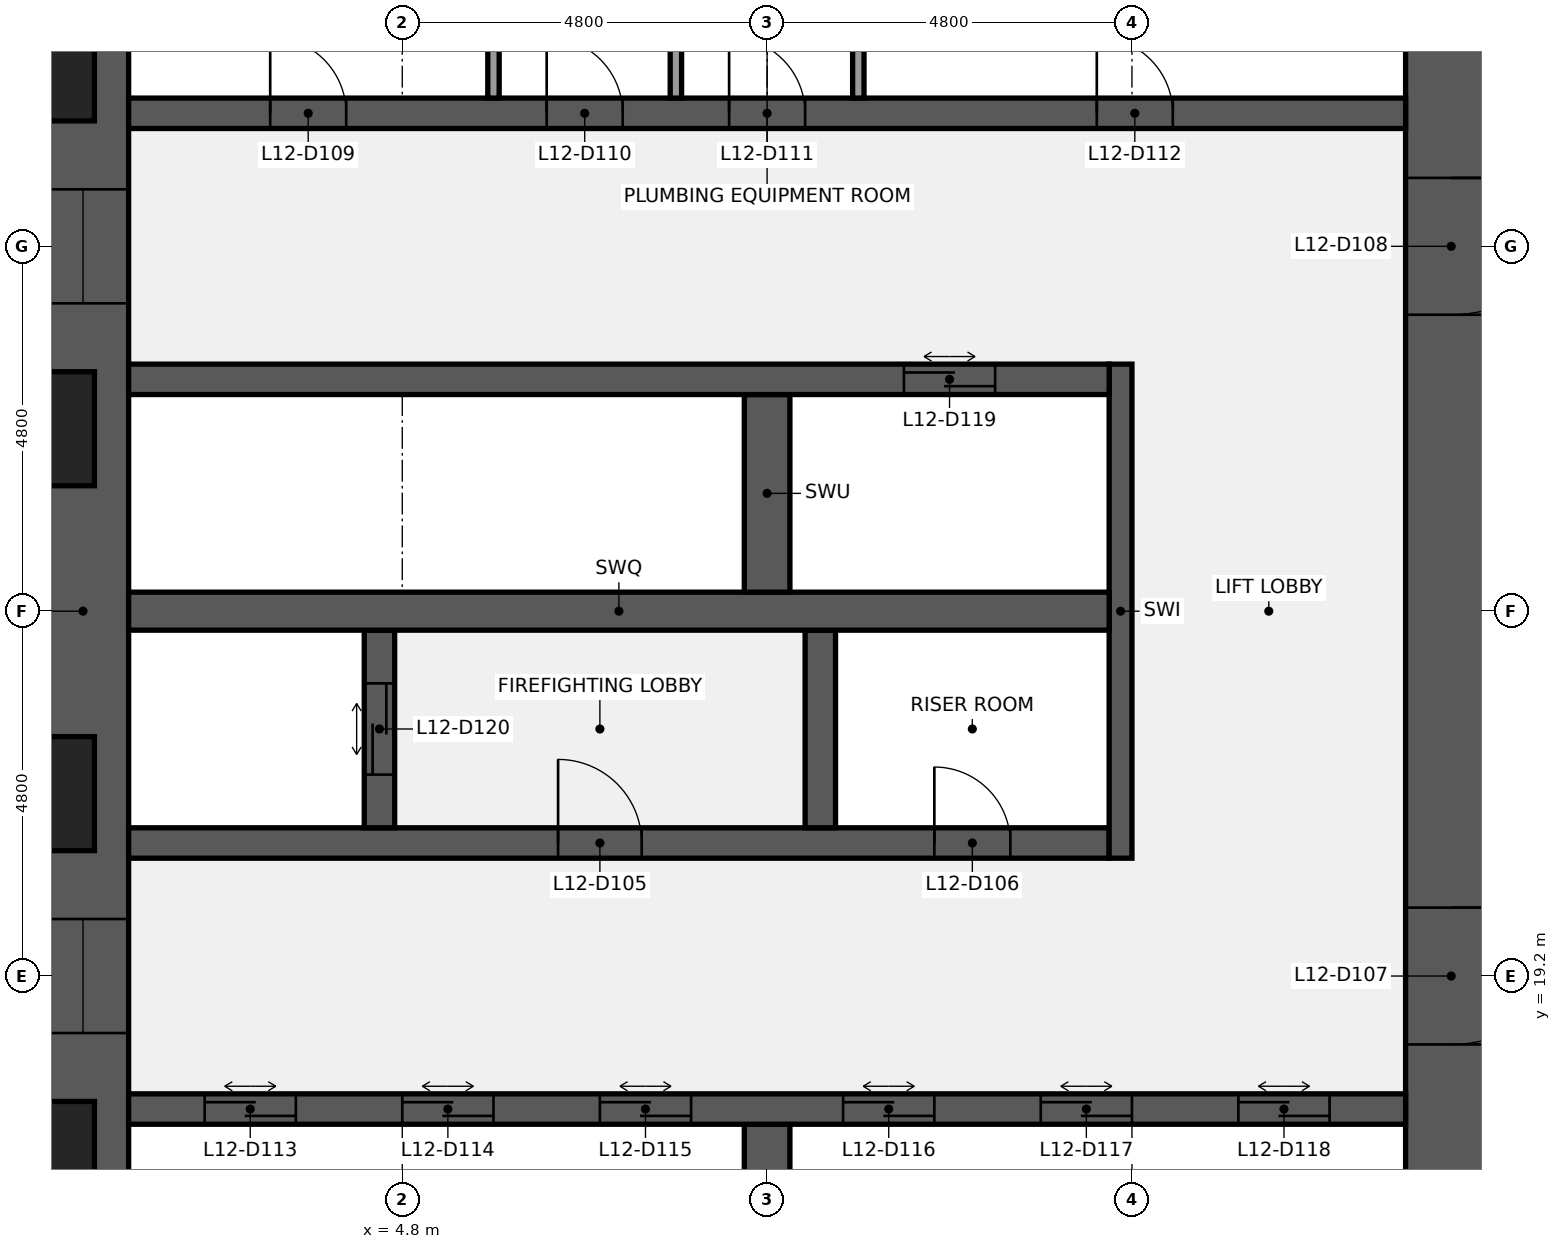
"""IFC4 building model, lengths in metres.
Left out: names, types, materials, properties, quantities, classifications, styles, units other than length and angle.
Written with IfcOpenShell. Run it as: python <this file> out.ifc"""

import sys

from ifc_helpers import new_model, si_unit, direction, frame, frame_2d, origin, place, context, subcontext, project, spatial, rectangle, extrude, element, fill, save


model = new_model("IFC4")
c1 = context("Model", 3, precision=1e-05, world=origin(), true_north=direction((0.0, 1.0)))
c2 = subcontext(c1, "Body", "Model", "MODEL_VIEW")
j1 = project(units=[si_unit("LENGTHUNIT", "METRE"), si_unit("PLANEANGLEUNIT", "RADIAN")], contexts=[c1])
p1 = place(None, origin())
s1 = spatial("IfcSite", under=j1, at=p1, CompositionType="ELEMENT")
p2 = place(p1, origin())
s2 = spatial("IfcBuilding", under=s1, at=p2, CompositionType="ELEMENT")
p3 = place(p2, frame((0.0, 0.0, 59.0)))
s3 = spatial("IfcBuildingStorey", under=s2, at=p3, CompositionType="ELEMENT", Elevation=59.0)
p4 = place(p3, frame((0.6, 9.6, 0.0), z_axis=(0.0, 0.0, 1.0), x_axis=(0.0, 1.0, 0.0)))
e1 = element("IfcWall", 1, at=p4, inside=s3, PredefinedType="SHEAR", context=c2, shape_type="SweptSolid", body=[
    extrude(rectangle(XDim=28.8, YDim=1.2, at=frame_2d((14.4, 0.0))), origin(), (0.0, 0.0, 1.0), 3.84),
])
p5 = place(p4, frame((8.85, 0.0, 0.9)))
e2 = element("IfcOpeningElement", 2, at=p5, cuts=e1, PredefinedType="OPENING", context=c2, shape_type="SweptSolid", body=[
    extrude(rectangle(XDim=1.5, YDim=1.5, at=frame_2d((0.75, 0.75))), frame((0.0, 0.61, 0.0), z_axis=(0.0, -1.0, 0.0), x_axis=(1.0, 0.0, 0.0)), (0.0, 0.0, 1.0), 1.22),
])
p6 = place(p4, frame((18.45, 0.0, 0.9)))
e3 = element("IfcOpeningElement", 3, at=p6, cuts=e1, PredefinedType="OPENING", context=c2, shape_type="SweptSolid", body=[
    extrude(rectangle(XDim=1.5, YDim=1.5, at=frame_2d((0.75, 0.75))), frame((0.0, 0.61, 0.0), z_axis=(0.0, -1.0, 0.0), x_axis=(1.0, 0.0, 0.0)), (0.0, 0.0, 1.0), 1.22),
])
p7 = place(p3, frame((18.6, 38.4, 0.0), z_axis=(0.0, 0.0, 1.0), x_axis=(0.0, -1.0, 0.0)))
e4 = element("IfcWall", 4, at=p7, inside=s3, PredefinedType="SHEAR", context=c2, shape_type="SweptSolid", body=[
    extrude(rectangle(XDim=28.8, YDim=1.2, at=frame_2d((14.4, 0.0))), origin(), (0.0, 0.0, 1.0), 3.84),
])
p8 = place(p7, frame((18.3, 0.0, 0.0)))
e5 = element("IfcOpeningElement", 5, at=p8, cuts=e4, PredefinedType="OPENING", context=c2, shape_type="SweptSolid", body=[
    extrude(rectangle(XDim=1.8, YDim=2.1, at=frame_2d((0.9, 1.05))), frame((0.0, 0.61, 0.0), z_axis=(0.0, -1.0, 0.0), x_axis=(1.0, 0.0, 0.0)), (0.0, 0.0, 1.0), 1.22),
])
p9 = place(p7, frame((8.7, 0.0, 0.0)))
e6 = element("IfcOpeningElement", 6, at=p9, cuts=e4, PredefinedType="OPENING", context=c2, shape_type="SweptSolid", body=[
    extrude(rectangle(XDim=1.8, YDim=2.1, at=frame_2d((0.9, 1.05))), frame((0.0, 0.61, 0.0), z_axis=(0.0, -1.0, 0.0), x_axis=(1.0, 0.0, 0.0)), (0.0, 0.0, 1.0), 1.22),
])
p10 = place(p3, frame((9.6, 14.65, 0.0), z_axis=(0.0, 0.0, 1.0), x_axis=(0.0, 1.0, 0.0)))
e7 = element("IfcWall", 7, at=p10, inside=s3, PredefinedType="SHEAR", context=c2, shape_type="SweptSolid", body=[
    extrude(rectangle(XDim=2.6, YDim=0.6, at=frame_2d((1.3, 0.0))), origin(), (0.0, 0.0, 1.0), 3.84),
])
p11 = place(p3, frame((1.2, 17.45, 0.0), z_axis=(0.0, 0.0, 1.0), x_axis=(1.0, 0.0, 0.0)))
e8 = element("IfcWall", 8, at=p11, inside=s3, PredefinedType="SHEAR", context=c2, shape_type="SweptSolid", body=[
    extrude(rectangle(XDim=16.8, YDim=0.4, at=frame_2d((8.4, 0.0))), origin(), (0.0, 0.0, 1.0), 3.84),
])
p12 = place(p11, frame((1.0, 0.0, 0.0)))
e9 = element("IfcOpeningElement", 9, at=p12, cuts=e8, PredefinedType="OPENING", context=c2, shape_type="SweptSolid", body=[
    extrude(rectangle(XDim=1.2, YDim=2.1, at=frame_2d((0.6, 1.05))), frame((0.0, 0.21, 0.0), z_axis=(0.0, -1.0, 0.0), x_axis=(1.0, 0.0, 0.0)), (0.0, 0.0, 1.0), 0.42),
])
p13 = place(p11, frame((3.6, 0.0, 0.0)))
e10 = element("IfcOpeningElement", 10, at=p13, cuts=e8, PredefinedType="OPENING", context=c2, shape_type="SweptSolid", body=[
    extrude(rectangle(XDim=1.2, YDim=2.1, at=frame_2d((0.6, 1.05))), frame((0.0, 0.21, 0.0), z_axis=(0.0, -1.0, 0.0), x_axis=(1.0, 0.0, 0.0)), (0.0, 0.0, 1.0), 0.42),
])
p14 = place(p11, frame((6.2, 0.0, 0.0)))
e11 = element("IfcOpeningElement", 11, at=p14, cuts=e8, PredefinedType="OPENING", context=c2, shape_type="SweptSolid", body=[
    extrude(rectangle(XDim=1.2, YDim=2.1, at=frame_2d((0.6, 1.05))), frame((0.0, 0.21, 0.0), z_axis=(0.0, -1.0, 0.0), x_axis=(1.0, 0.0, 0.0)), (0.0, 0.0, 1.0), 0.42),
])
p15 = place(p11, frame((9.4, 0.0, 0.0)))
e12 = element("IfcOpeningElement", 12, at=p15, cuts=e8, PredefinedType="OPENING", context=c2, shape_type="SweptSolid", body=[
    extrude(rectangle(XDim=1.2, YDim=2.1, at=frame_2d((0.6, 1.05))), frame((0.0, 0.21, 0.0), z_axis=(0.0, -1.0, 0.0), x_axis=(1.0, 0.0, 0.0)), (0.0, 0.0, 1.0), 0.42),
])
p16 = place(p11, frame((12.0, 0.0, 0.0)))
e13 = element("IfcOpeningElement", 13, at=p16, cuts=e8, PredefinedType="OPENING", context=c2, shape_type="SweptSolid", body=[
    extrude(rectangle(XDim=1.2, YDim=2.1, at=frame_2d((0.6, 1.05))), frame((0.0, 0.21, 0.0), z_axis=(0.0, -1.0, 0.0), x_axis=(1.0, 0.0, 0.0)), (0.0, 0.0, 1.0), 0.42),
])
p17 = place(p11, frame((14.6, 0.0, 0.0)))
e14 = element("IfcOpeningElement", 14, at=p17, cuts=e8, PredefinedType="OPENING", context=c2, shape_type="SweptSolid", body=[
    extrude(rectangle(XDim=1.2, YDim=2.1, at=frame_2d((0.6, 1.05))), frame((0.0, 0.21, 0.0), z_axis=(0.0, -1.0, 0.0), x_axis=(1.0, 0.0, 0.0)), (0.0, 0.0, 1.0), 0.42),
])
p18 = place(p3, frame((1.2, 20.95, 0.0), z_axis=(0.0, 0.0, 1.0), x_axis=(1.0, 0.0, 0.0)))
e15 = element("IfcWall", 15, at=p18, inside=s3, PredefinedType="SHEAR", context=c2, shape_type="SweptSolid", body=[
    extrude(rectangle(XDim=12.9, YDim=0.4, at=frame_2d((6.45, 0.0))), origin(), (0.0, 0.0, 1.0), 3.84),
])
p19 = place(p18, frame((5.65, 0.0, 0.0)))
e16 = element("IfcOpeningElement", 16, at=p19, cuts=e15, PredefinedType="OPENING", context=c2, shape_type="SweptSolid", body=[
    extrude(rectangle(XDim=1.1, YDim=2.1, at=frame_2d((0.55, 1.05))), frame((0.0, 0.21, 0.0), z_axis=(0.0, -1.0, 0.0), x_axis=(1.0, 0.0, 0.0)), (0.0, 0.0, 1.0), 0.42),
])
p20 = place(p18, frame((10.6, 0.0, 0.0)))
e17 = element("IfcOpeningElement", 17, at=p20, cuts=e15, PredefinedType="OPENING", context=c2, shape_type="SweptSolid", body=[
    extrude(rectangle(XDim=1.0, YDim=2.1, at=frame_2d((0.5, 1.05))), frame((0.0, 0.21, 0.0), z_axis=(0.0, -1.0, 0.0), x_axis=(1.0, 0.0, 0.0)), (0.0, 0.0, 1.0), 0.42),
])
p21 = place(p3, frame((14.25, 20.75, 0.0), z_axis=(0.0, 0.0, 1.0), x_axis=(0.0, 1.0, 0.0)))
e18 = element("IfcWall", 18, at=p21, inside=s3, PredefinedType="SHEAR", context=c2, shape_type="SweptSolid", body=[
    extrude(rectangle(XDim=6.5, YDim=0.3, at=frame_2d((3.25, 0.0))), origin(), (0.0, 0.0, 1.0), 3.84),
])
p22 = place(p3, frame((4.5, 21.15, 0.0), z_axis=(0.0, 0.0, 1.0), x_axis=(0.0, 1.0, 0.0)))
e19 = element("IfcWall", 19, at=p22, inside=s3, PredefinedType="SHEAR", context=c2, shape_type="SweptSolid", body=[
    extrude(rectangle(XDim=2.6, YDim=0.4, at=frame_2d((1.3, 0.0))), origin(), (0.0, 0.0, 1.0), 3.84),
])
p23 = place(p22, frame((0.7, 0.0, 0.0)))
e20 = element("IfcOpeningElement", 20, at=p23, cuts=e19, PredefinedType="OPENING", context=c2, shape_type="SweptSolid", body=[
    extrude(rectangle(XDim=1.2, YDim=2.1, at=frame_2d((0.6, 1.05))), frame((0.0, 0.21, 0.0), z_axis=(0.0, -1.0, 0.0), x_axis=(1.0, 0.0, 0.0)), (0.0, 0.0, 1.0), 0.42),
])
p24 = place(p3, frame((10.3, 21.15, 0.0), z_axis=(0.0, 0.0, 1.0), x_axis=(0.0, 1.0, 0.0)))
e21 = element("IfcWall", 21, at=p24, inside=s3, PredefinedType="SHEAR", context=c2, shape_type="SweptSolid", body=[
    extrude(rectangle(XDim=2.6, YDim=0.4, at=frame_2d((1.3, 0.0))), origin(), (0.0, 0.0, 1.0), 3.84),
])
p25 = place(p3, frame((1.2, 24.0, 0.0), z_axis=(0.0, 0.0, 1.0), x_axis=(1.0, 0.0, 0.0)))
e22 = element("IfcWall", 22, at=p25, inside=s3, PredefinedType="SHEAR", context=c2, shape_type="SweptSolid", body=[
    extrude(rectangle(XDim=12.9, YDim=0.5, at=frame_2d((6.45, 0.0))), origin(), (0.0, 0.0, 1.0), 3.84),
])
p26 = place(p3, frame((9.6, 24.25, 0.0), z_axis=(0.0, 0.0, 1.0), x_axis=(0.0, 1.0, 0.0)))
e23 = element("IfcWall", 23, at=p26, inside=s3, PredefinedType="SHEAR", context=c2, shape_type="SweptSolid", body=[
    extrude(rectangle(XDim=2.6, YDim=0.6, at=frame_2d((1.3, 0.0))), origin(), (0.0, 0.0, 1.0), 3.84),
])
p27 = place(p3, frame((1.2, 27.05, 0.0), z_axis=(0.0, 0.0, 1.0), x_axis=(1.0, 0.0, 0.0)))
e24 = element("IfcWall", 24, at=p27, inside=s3, PredefinedType="SHEAR", context=c2, shape_type="SweptSolid", body=[
    extrude(rectangle(XDim=12.9, YDim=0.4, at=frame_2d((6.45, 0.0))), origin(), (0.0, 0.0, 1.0), 3.84),
])
p28 = place(p27, frame((10.2, 0.0, 0.0)))
e25 = element("IfcOpeningElement", 25, at=p28, cuts=e24, PredefinedType="OPENING", context=c2, shape_type="SweptSolid", body=[
    extrude(rectangle(XDim=1.2, YDim=2.1, at=frame_2d((0.6, 1.05))), frame((0.0, 0.21, 0.0), z_axis=(0.0, -1.0, 0.0), x_axis=(1.0, 0.0, 0.0)), (0.0, 0.0, 1.0), 0.42),
])
p29 = place(p3, frame((1.2, 30.55, 0.0), z_axis=(0.0, 0.0, 1.0), x_axis=(1.0, 0.0, 0.0)))
e26 = element("IfcWall", 26, at=p29, inside=s3, PredefinedType="SHEAR", context=c2, shape_type="SweptSolid", body=[
    extrude(rectangle(XDim=16.8, YDim=0.4, at=frame_2d((8.4, 0.0))), origin(), (0.0, 0.0, 1.0), 3.84),
])
p30 = place(p29, frame((1.863, 0.0, 0.0)))
e27 = element("IfcOpeningElement", 27, at=p30, cuts=e26, PredefinedType="OPENING", context=c2, shape_type="SweptSolid", body=[
    extrude(rectangle(XDim=1.0, YDim=2.1, at=frame_2d((0.5, 1.05))), frame((0.0, 0.21, 0.0), z_axis=(0.0, -1.0, 0.0), x_axis=(1.0, 0.0, 0.0)), (0.0, 0.0, 1.0), 0.42),
])
p31 = place(p29, frame((5.5, 0.0, 0.0)))
e28 = element("IfcOpeningElement", 28, at=p31, cuts=e26, PredefinedType="OPENING", context=c2, shape_type="SweptSolid", body=[
    extrude(rectangle(XDim=1.0, YDim=2.1, at=frame_2d((0.5, 1.05))), frame((0.0, 0.21, 0.0), z_axis=(0.0, -1.0, 0.0), x_axis=(1.0, 0.0, 0.0)), (0.0, 0.0, 1.0), 0.42),
])
p32 = place(p29, frame((7.9, 0.0, 0.0)))
e29 = element("IfcOpeningElement", 29, at=p32, cuts=e26, PredefinedType="OPENING", context=c2, shape_type="SweptSolid", body=[
    extrude(rectangle(XDim=1.0, YDim=2.1, at=frame_2d((0.5, 1.05))), frame((0.0, 0.21, 0.0), z_axis=(0.0, -1.0, 0.0), x_axis=(1.0, 0.0, 0.0)), (0.0, 0.0, 1.0), 0.42),
])
p33 = place(p29, frame((12.738, 0.0, 0.0)))
e30 = element("IfcOpeningElement", 30, at=p33, cuts=e26, PredefinedType="OPENING", context=c2, shape_type="SweptSolid", body=[
    extrude(rectangle(XDim=1.0, YDim=2.1, at=frame_2d((0.5, 1.05))), frame((0.0, 0.21, 0.0), z_axis=(0.0, -1.0, 0.0), x_axis=(1.0, 0.0, 0.0)), (0.0, 0.0, 1.0), 0.42),
])
for number, where, z_axis, x_axis in (
    (31, (6.0, 30.75, 0.0), (0.0, 0.0, 1.0), (0.0, 1.0, 0.0)),
    (32, (8.4, 30.75, 0.0), (0.0, 0.0, 1.0), (0.0, 1.0, 0.0)),
    (33, (10.8, 30.75, 0.0), (0.0, 0.0, 1.0), (0.0, 1.0, 0.0)),
):
    element("IfcWall", number, at=place(p3, frame(where, z_axis=z_axis, x_axis=x_axis)), inside=s3, PredefinedType="PARTITIONING", context=c2, shape_type="SweptSolid", body=[
        extrude(rectangle(XDim=2.6, YDim=0.15, at=frame_2d((1.3, 0.0))), origin(), (0.0, 0.0, 1.0), 3.84),
    ])
p34 = place(p19, origin())
e34 = element("IfcDoor", 34, at=p34, inside=s3, OperationType="SINGLE_SWING_LEFT", PredefinedType="DOOR", context=c2, shape_type="SweptSolid", body=[
    extrude(rectangle(XDim=1.1, YDim=2.1, at=frame_2d((0.55, 1.05))), frame((0.0, 0.025, 0.0), z_axis=(0.0, -1.0, 0.0), x_axis=(1.0, 0.0, 0.0)), (0.0, 0.0, 1.0), 0.05),
])
fill(e16, e34)
p35 = place(p20, origin())
e35 = element("IfcDoor", 35, at=p35, inside=s3, OperationType="SINGLE_SWING_LEFT", PredefinedType="DOOR", context=c2, shape_type="SweptSolid", body=[
    extrude(rectangle(XDim=1.0, YDim=2.1, at=frame_2d((0.5, 1.05))), frame((0.0, 0.025, 0.0), z_axis=(0.0, -1.0, 0.0), x_axis=(1.0, 0.0, 0.0)), (0.0, 0.0, 1.0), 0.05),
])
fill(e17, e35)
p36 = place(p8, origin())
e36 = element("IfcDoor", 36, at=p36, inside=s3, OperationType="DOUBLE_DOOR_SINGLE_SWING", PredefinedType="DOOR", context=c2, shape_type="SweptSolid", body=[
    extrude(rectangle(XDim=1.8, YDim=2.1, at=frame_2d((0.9, 1.05))), frame((0.0, 0.025, 0.0), z_axis=(0.0, -1.0, 0.0), x_axis=(1.0, 0.0, 0.0)), (0.0, 0.0, 1.0), 0.05),
])
fill(e5, e36)
p37 = place(p9, origin())
e37 = element("IfcDoor", 37, at=p37, inside=s3, OperationType="DOUBLE_DOOR_SINGLE_SWING", PredefinedType="DOOR", context=c2, shape_type="SweptSolid", body=[
    extrude(rectangle(XDim=1.8, YDim=2.1, at=frame_2d((0.9, 1.05))), frame((0.0, 0.025, 0.0), z_axis=(0.0, -1.0, 0.0), x_axis=(1.0, 0.0, 0.0)), (0.0, 0.0, 1.0), 0.05),
])
fill(e6, e37)
p38 = place(p30, origin())
e38 = element("IfcDoor", 38, at=p38, inside=s3, OperationType="SINGLE_SWING_LEFT", PredefinedType="DOOR", context=c2, shape_type="SweptSolid", body=[
    extrude(rectangle(XDim=1.0, YDim=2.1, at=frame_2d((0.5, 1.05))), frame((0.0, 0.025, 0.0), z_axis=(0.0, -1.0, 0.0), x_axis=(1.0, 0.0, 0.0)), (0.0, 0.0, 1.0), 0.05),
])
fill(e27, e38)
p39 = place(p31, origin())
e39 = element("IfcDoor", 39, at=p39, inside=s3, OperationType="SINGLE_SWING_LEFT", PredefinedType="DOOR", context=c2, shape_type="SweptSolid", body=[
    extrude(rectangle(XDim=1.0, YDim=2.1, at=frame_2d((0.5, 1.05))), frame((0.0, 0.025, 0.0), z_axis=(0.0, -1.0, 0.0), x_axis=(1.0, 0.0, 0.0)), (0.0, 0.0, 1.0), 0.05),
])
fill(e28, e39)
p40 = place(p32, origin())
e40 = element("IfcDoor", 40, at=p40, inside=s3, OperationType="SINGLE_SWING_LEFT", PredefinedType="DOOR", context=c2, shape_type="SweptSolid", body=[
    extrude(rectangle(XDim=1.0, YDim=2.1, at=frame_2d((0.5, 1.05))), frame((0.0, 0.025, 0.0), z_axis=(0.0, -1.0, 0.0), x_axis=(1.0, 0.0, 0.0)), (0.0, 0.0, 1.0), 0.05),
])
fill(e29, e40)
p41 = place(p33, origin())
e41 = element("IfcDoor", 41, at=p41, inside=s3, OperationType="SINGLE_SWING_LEFT", PredefinedType="DOOR", context=c2, shape_type="SweptSolid", body=[
    extrude(rectangle(XDim=1.0, YDim=2.1, at=frame_2d((0.5, 1.05))), frame((0.0, 0.025, 0.0), z_axis=(0.0, -1.0, 0.0), x_axis=(1.0, 0.0, 0.0)), (0.0, 0.0, 1.0), 0.05),
])
fill(e30, e41)
p42 = place(p12, origin())
e42 = element("IfcDoor", 42, at=p42, inside=s3, OperationType="DOUBLE_DOOR_SLIDING", PredefinedType="DOOR", context=c2, shape_type="SweptSolid", body=[
    extrude(rectangle(XDim=1.2, YDim=2.1, at=frame_2d((0.6, 1.05))), frame((0.0, 0.025, 0.0), z_axis=(0.0, -1.0, 0.0), x_axis=(1.0, 0.0, 0.0)), (0.0, 0.0, 1.0), 0.05),
])
fill(e9, e42)
p43 = place(p13, origin())
e43 = element("IfcDoor", 43, at=p43, inside=s3, OperationType="DOUBLE_DOOR_SLIDING", PredefinedType="DOOR", context=c2, shape_type="SweptSolid", body=[
    extrude(rectangle(XDim=1.2, YDim=2.1, at=frame_2d((0.6, 1.05))), frame((0.0, 0.025, 0.0), z_axis=(0.0, -1.0, 0.0), x_axis=(1.0, 0.0, 0.0)), (0.0, 0.0, 1.0), 0.05),
])
fill(e10, e43)
p44 = place(p14, origin())
e44 = element("IfcDoor", 44, at=p44, inside=s3, OperationType="DOUBLE_DOOR_SLIDING", PredefinedType="DOOR", context=c2, shape_type="SweptSolid", body=[
    extrude(rectangle(XDim=1.2, YDim=2.1, at=frame_2d((0.6, 1.05))), frame((0.0, 0.025, 0.0), z_axis=(0.0, -1.0, 0.0), x_axis=(1.0, 0.0, 0.0)), (0.0, 0.0, 1.0), 0.05),
])
fill(e11, e44)
p45 = place(p15, origin())
e45 = element("IfcDoor", 45, at=p45, inside=s3, OperationType="DOUBLE_DOOR_SLIDING", PredefinedType="DOOR", context=c2, shape_type="SweptSolid", body=[
    extrude(rectangle(XDim=1.2, YDim=2.1, at=frame_2d((0.6, 1.05))), frame((0.0, 0.025, 0.0), z_axis=(0.0, -1.0, 0.0), x_axis=(1.0, 0.0, 0.0)), (0.0, 0.0, 1.0), 0.05),
])
fill(e12, e45)
p46 = place(p16, origin())
e46 = element("IfcDoor", 46, at=p46, inside=s3, OperationType="DOUBLE_DOOR_SLIDING", PredefinedType="DOOR", context=c2, shape_type="SweptSolid", body=[
    extrude(rectangle(XDim=1.2, YDim=2.1, at=frame_2d((0.6, 1.05))), frame((0.0, 0.025, 0.0), z_axis=(0.0, -1.0, 0.0), x_axis=(1.0, 0.0, 0.0)), (0.0, 0.0, 1.0), 0.05),
])
fill(e13, e46)
p47 = place(p17, origin())
e47 = element("IfcDoor", 47, at=p47, inside=s3, OperationType="DOUBLE_DOOR_SLIDING", PredefinedType="DOOR", context=c2, shape_type="SweptSolid", body=[
    extrude(rectangle(XDim=1.2, YDim=2.1, at=frame_2d((0.6, 1.05))), frame((0.0, 0.025, 0.0), z_axis=(0.0, -1.0, 0.0), x_axis=(1.0, 0.0, 0.0)), (0.0, 0.0, 1.0), 0.05),
])
fill(e14, e47)
p48 = place(p28, origin())
e48 = element("IfcDoor", 48, at=p48, inside=s3, OperationType="DOUBLE_DOOR_SLIDING", PredefinedType="DOOR", context=c2, shape_type="SweptSolid", body=[
    extrude(rectangle(XDim=1.2, YDim=2.1, at=frame_2d((0.6, 1.05))), frame((0.0, 0.025, 0.0), z_axis=(0.0, -1.0, 0.0), x_axis=(1.0, 0.0, 0.0)), (0.0, 0.0, 1.0), 0.05),
])
fill(e25, e48)
p49 = place(p23, origin())
e49 = element("IfcDoor", 49, at=p49, inside=s3, OperationType="DOUBLE_DOOR_SLIDING", PredefinedType="DOOR", context=c2, shape_type="SweptSolid", body=[
    extrude(rectangle(XDim=1.2, YDim=2.1, at=frame_2d((0.6, 1.05))), frame((0.0, 0.025, 0.0), z_axis=(0.0, -1.0, 0.0), x_axis=(1.0, 0.0, 0.0)), (0.0, 0.0, 1.0), 0.05),
])
fill(e20, e49)
p50 = place(p5, origin())
e50 = element("IfcWindow", 50, at=p50, inside=s3, PartitioningType="SINGLE_PANEL", PredefinedType="WINDOW", context=c2, shape_type="SweptSolid", body=[
    extrude(rectangle(XDim=1.5, YDim=1.5, at=frame_2d((0.75, 0.75))), frame((0.0, 0.03, 0.0), z_axis=(0.0, -1.0, 0.0), x_axis=(1.0, 0.0, 0.0)), (0.0, 0.0, 1.0), 0.06),
])
fill(e2, e50)
p51 = place(p6, origin())
e51 = element("IfcWindow", 51, at=p51, inside=s3, PartitioningType="SINGLE_PANEL", PredefinedType="WINDOW", context=c2, shape_type="SweptSolid", body=[
    extrude(rectangle(XDim=1.5, YDim=1.5, at=frame_2d((0.75, 0.75))), frame((0.0, 0.03, 0.0), z_axis=(0.0, -1.0, 0.0), x_axis=(1.0, 0.0, 0.0)), (0.0, 0.0, 1.0), 0.06),
])
fill(e3, e51)
save(model, sys.argv[1])
